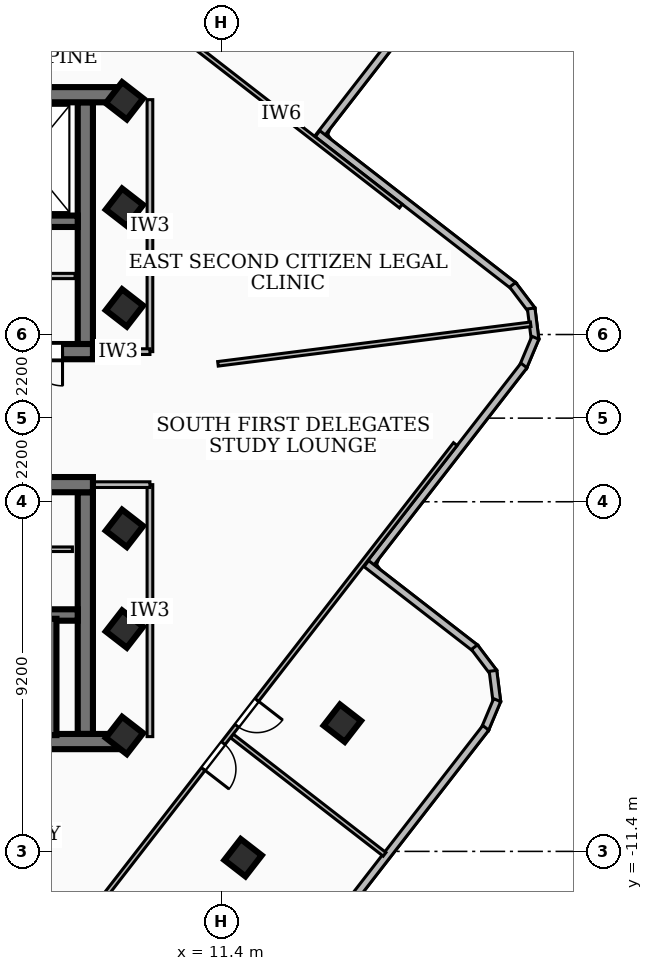
"""IFC4 building model, lengths in metres.
Left out: names, types, materials, properties, quantities, classifications, styles, units other than length and angle.
Written with IfcOpenShell. Run it as: python <this file> out.ifc"""

import sys

from ifc_helpers import new_model, si_unit, direction, frame, frame_2d, origin, origin_2d, place, context, subcontext, project, spatial, rectangle, extrude, element, fill, save


model = new_model("IFC4")
c1 = context("Model", 3, precision=1e-05, world=origin(), true_north=direction((0.0, 1.0)))
c2 = subcontext(c1, "Body", "Model", "MODEL_VIEW")
j1 = project(units=[si_unit("LENGTHUNIT", "METRE"), si_unit("PLANEANGLEUNIT", "RADIAN")], contexts=[c1])
p1 = place(None, origin())
s1 = spatial("IfcSite", under=j1, at=p1, CompositionType="ELEMENT")
p2 = place(p1, origin())
s2 = spatial("IfcBuilding", under=s1, at=p2, CompositionType="ELEMENT")
p3 = place(p2, frame((0.0, 0.0, 261.18)))
s3 = spatial("IfcBuildingStorey", under=s2, at=p3, CompositionType="ELEMENT", Elevation=261.18)
p4 = place(p3, frame((-8.78, 8.51, 0.0), z_axis=(0.0, 0.0, 1.0), x_axis=(1.0, 0.0, 0.0)))
e1 = element("IfcWall", 1, at=p4, inside=s3, PredefinedType="SHEAR", context=c2, shape_type="SweptSolid", body=[
    extrude(rectangle(XDim=17.56, YDim=0.4, at=frame_2d((8.78, 0.0))), origin(), (0.0, 0.0, 1.0), 3.16),
])
p5 = place(p3, frame((8.02, 1.75, 0.0), z_axis=(0.0, 0.0, 1.0), x_axis=(-1.0, 0.0, 0.0)))
e2 = element("IfcWall", 2, at=p5, inside=s3, PredefinedType="SHEAR", context=c2, shape_type="SweptSolid", body=[
    extrude(rectangle(XDim=16.04, YDim=0.4, at=frame_2d((8.02, 0.0))), origin(), (0.0, 0.0, 1.0), 3.16),
])
p6 = place(p5, frame((7.45, 0.0, 0.0)))
e3 = element("IfcOpeningElement", 3, at=p6, cuts=e2, PredefinedType="OPENING", context=c2, shape_type="SweptSolid", body=[
    extrude(rectangle(XDim=1.0, YDim=2.1, at=frame_2d((0.5, 1.05))), frame((0.0, 0.21, 0.0), z_axis=(0.0, -1.0, 0.0), x_axis=(1.0, 0.0, 0.0)), (0.0, 0.0, 1.0), 0.42),
])
p7 = place(p5, frame((14.285, 0.0, 0.0)))
e4 = element("IfcOpeningElement", 4, at=p7, cuts=e2, PredefinedType="OPENING", context=c2, shape_type="SweptSolid", body=[
    extrude(rectangle(XDim=1.05, YDim=2.15, at=frame_2d((0.525, 1.075))), frame((0.0, 0.21, 0.0), z_axis=(0.0, -1.0, 0.0), x_axis=(1.0, 0.0, 0.0)), (0.0, 0.0, 1.0), 0.42),
])
p8 = place(p5, frame((12.725, 0.0, 0.0)))
e5 = element("IfcOpeningElement", 5, at=p8, cuts=e2, PredefinedType="OPENING", context=c2, shape_type="SweptSolid", body=[
    extrude(rectangle(XDim=1.05, YDim=2.15, at=frame_2d((0.525, 1.075))), frame((0.0, 0.21, 0.0), z_axis=(0.0, -1.0, 0.0), x_axis=(1.0, 0.0, 0.0)), (0.0, 0.0, 1.0), 0.42),
])
p9 = place(p5, frame((11.165, 0.0, 0.0)))
e6 = element("IfcOpeningElement", 6, at=p9, cuts=e2, PredefinedType="OPENING", context=c2, shape_type="SweptSolid", body=[
    extrude(rectangle(XDim=1.05, YDim=2.15, at=frame_2d((0.525, 1.075))), frame((0.0, 0.21, 0.0), z_axis=(0.0, -1.0, 0.0), x_axis=(1.0, 0.0, 0.0)), (0.0, 0.0, 1.0), 0.42),
])
p10 = place(p5, frame((3.85, 0.0, 0.0)))
e7 = element("IfcOpeningElement", 7, at=p10, cuts=e2, PredefinedType="OPENING", context=c2, shape_type="SweptSolid", body=[
    extrude(rectangle(XDim=0.9, YDim=2.06, at=frame_2d((0.45, 1.03))), frame((0.0, 0.21, 0.0), z_axis=(0.0, -1.0, 0.0), x_axis=(1.0, 0.0, 0.0)), (0.0, 0.0, 1.0), 0.42),
])
p11 = place(p5, frame((2.35, 0.0, 0.0)))
e8 = element("IfcOpeningElement", 8, at=p11, cuts=e2, PredefinedType="OPENING", context=c2, shape_type="SweptSolid", body=[
    extrude(rectangle(XDim=0.9, YDim=2.06, at=frame_2d((0.45, 1.03))), frame((0.0, 0.21, 0.0), z_axis=(0.0, -1.0, 0.0), x_axis=(1.0, 0.0, 0.0)), (0.0, 0.0, 1.0), 0.42),
])
p12 = place(p5, frame((0.8, 0.0, 0.0)))
e9 = element("IfcOpeningElement", 9, at=p12, cuts=e2, PredefinedType="OPENING", context=c2, shape_type="SweptSolid", body=[
    extrude(rectangle(XDim=0.9, YDim=2.06, at=frame_2d((0.45, 1.03))), frame((0.0, 0.21, 0.0), z_axis=(0.0, -1.0, 0.0), x_axis=(1.0, 0.0, 0.0)), (0.0, 0.0, 1.0), 0.42),
])
p13 = place(p3, frame((7.82, 8.31, 0.0), z_axis=(0.0, 0.0, 1.0), x_axis=(0.0, -1.0, 0.0)))
e10 = element("IfcWall", 10, at=p13, inside=s3, PredefinedType="SHEAR", context=c2, shape_type="SweptSolid", body=[
    extrude(rectangle(XDim=6.36, YDim=0.4, at=frame_2d((3.18, 0.0))), origin(), (0.0, 0.0, 1.0), 3.16),
])
p14 = place(p3, frame((7.62, 5.18, 0.0), z_axis=(0.0, 0.0, 1.0), x_axis=(-1.0, 0.0, 0.0)))
e11 = element("IfcWall", 11, at=p14, inside=s3, PredefinedType="SOLIDWALL", context=c2, shape_type="SweptSolid", body=[
    extrude(rectangle(XDim=15.24, YDim=0.3, at=frame_2d((7.62, 0.0))), origin(), (0.0, 0.0, 1.0), 3.16),
])
p15 = place(p14, frame((5.77, 0.0, 0.0)))
e12 = element("IfcOpeningElement", 12, at=p15, cuts=e11, PredefinedType="OPENING", context=c2, shape_type="SweptSolid", body=[
    extrude(rectangle(XDim=1.1, YDim=2.15, at=frame_2d((0.55, 1.075))), frame((0.0, 0.16, 0.0), z_axis=(0.0, -1.0, 0.0), x_axis=(1.0, 0.0, 0.0)), (0.0, 0.0, 1.0), 0.32),
])
p16 = place(p14, frame((2.97, 0.0, 0.0)))
e13 = element("IfcOpeningElement", 13, at=p16, cuts=e11, PredefinedType="OPENING", context=c2, shape_type="SweptSolid", body=[
    extrude(rectangle(XDim=1.1, YDim=2.15, at=frame_2d((0.55, 1.075))), frame((0.0, 0.16, 0.0), z_axis=(0.0, -1.0, 0.0), x_axis=(1.0, 0.0, 0.0)), (0.0, 0.0, 1.0), 0.32),
])
p17 = place(p14, frame((7.97, 0.0, 0.0)))
e14 = element("IfcOpeningElement", 14, at=p17, cuts=e11, PredefinedType="OPENING", context=c2, shape_type="SweptSolid", body=[
    extrude(rectangle(XDim=1.0, YDim=2.1, at=frame_2d((0.5, 1.05))), frame((0.0, 0.16, 0.0), z_axis=(0.0, -1.0, 0.0), x_axis=(1.0, 0.0, 0.0)), (0.0, 0.0, 1.0), 0.32),
])
p18 = place(p3, frame((8.78, -8.51, 0.0), z_axis=(0.0, 0.0, 1.0), x_axis=(-1.0, 0.0, 0.0)))
e15 = element("IfcWall", 15, at=p18, inside=s3, PredefinedType="SHEAR", context=c2, shape_type="SweptSolid", body=[
    extrude(rectangle(XDim=17.56, YDim=0.4, at=frame_2d((8.78, 0.0))), origin(), (0.0, 0.0, 1.0), 3.16),
])
p19 = place(p3, frame((-8.02, -1.75, 0.0), z_axis=(0.0, 0.0, 1.0), x_axis=(1.0, 0.0, 0.0)))
e16 = element("IfcWall", 16, at=p19, inside=s3, PredefinedType="SHEAR", context=c2, shape_type="SweptSolid", body=[
    extrude(rectangle(XDim=16.04, YDim=0.4, at=frame_2d((8.02, 0.0))), origin(), (0.0, 0.0, 1.0), 3.16),
])
p20 = place(p19, frame((7.45, 0.0, 0.0)))
e17 = element("IfcOpeningElement", 17, at=p20, cuts=e16, PredefinedType="OPENING", context=c2, shape_type="SweptSolid", body=[
    extrude(rectangle(XDim=1.0, YDim=2.1, at=frame_2d((0.5, 1.05))), frame((0.0, 0.21, 0.0), z_axis=(0.0, -1.0, 0.0), x_axis=(1.0, 0.0, 0.0)), (0.0, 0.0, 1.0), 0.42),
])
p21 = place(p19, frame((12.65, 0.0, 0.0)))
e18 = element("IfcOpeningElement", 18, at=p21, cuts=e16, PredefinedType="OPENING", context=c2, shape_type="SweptSolid", body=[
    extrude(rectangle(XDim=0.9, YDim=2.06, at=frame_2d((0.45, 1.03))), frame((0.0, 0.21, 0.0), z_axis=(0.0, -1.0, 0.0), x_axis=(1.0, 0.0, 0.0)), (0.0, 0.0, 1.0), 0.42),
])
p22 = place(p19, frame((2.25, 0.0, 0.0)))
e19 = element("IfcOpeningElement", 19, at=p22, cuts=e16, PredefinedType="OPENING", context=c2, shape_type="SweptSolid", body=[
    extrude(rectangle(XDim=0.9, YDim=2.06, at=frame_2d((0.45, 1.03))), frame((0.0, 0.21, 0.0), z_axis=(0.0, -1.0, 0.0), x_axis=(1.0, 0.0, 0.0)), (0.0, 0.0, 1.0), 0.42),
])
p23 = place(p3, frame((7.82, -1.95, 0.0), z_axis=(0.0, 0.0, 1.0), x_axis=(0.0, -1.0, 0.0)))
e20 = element("IfcWall", 20, at=p23, inside=s3, PredefinedType="SHEAR", context=c2, shape_type="SweptSolid", body=[
    extrude(rectangle(XDim=6.36, YDim=0.4, at=frame_2d((3.18, 0.0))), origin(), (0.0, 0.0, 1.0), 3.16),
])
p24 = place(p3, frame((-7.62, -5.18, 0.0), z_axis=(0.0, 0.0, 1.0), x_axis=(1.0, 0.0, 0.0)))
e21 = element("IfcWall", 21, at=p24, inside=s3, PredefinedType="SOLIDWALL", context=c2, shape_type="SweptSolid", body=[
    extrude(rectangle(XDim=15.24, YDim=0.3, at=frame_2d((7.62, 0.0))), origin(), (0.0, 0.0, 1.0), 3.16),
])
p25 = place(p24, frame((5.77, 0.0, 0.0)))
e22 = element("IfcOpeningElement", 22, at=p25, cuts=e21, PredefinedType="OPENING", context=c2, shape_type="SweptSolid", body=[
    extrude(rectangle(XDim=1.1, YDim=2.15, at=frame_2d((0.55, 1.075))), frame((0.0, 0.16, 0.0), z_axis=(0.0, -1.0, 0.0), x_axis=(1.0, 0.0, 0.0)), (0.0, 0.0, 1.0), 0.32),
])
p26 = place(p24, frame((7.97, 0.0, 0.0)))
e23 = element("IfcOpeningElement", 23, at=p26, cuts=e21, PredefinedType="OPENING", context=c2, shape_type="SweptSolid", body=[
    extrude(rectangle(XDim=1.0, YDim=2.1, at=frame_2d((0.5, 1.05))), frame((0.0, 0.16, 0.0), z_axis=(0.0, -1.0, 0.0), x_axis=(1.0, 0.0, 0.0)), (0.0, 0.0, 1.0), 0.32),
])
p27 = place(p3, frame((6.95, -8.34, 0.0), z_axis=(0.0, 0.0, 1.0), x_axis=(0.0, 1.0, 0.0)))
e24 = element("IfcWall", 24, at=p27, inside=s3, PredefinedType="SOLIDWALL", context=c2, shape_type="SweptSolid", body=[
    extrude(rectangle(XDim=3.06, YDim=0.22, at=frame_2d((1.53, 0.0))), origin(), (0.0, 0.0, 1.0), 3.16),
])
for number, where, z_axis, x_axis in (
    (25, (8.85, -5.55, 0.0), (0.0, 0.0, 1.0), (0.613, 0.79, 0.0)),
    (26, (8.85, -2.9, 0.0), (0.0, 0.0, 1.0), (0.613, 0.79, 0.0)),
    (27, (8.85, 2.9, 0.0), (0.0, 0.0, 1.0), (0.613, 0.79, 0.0)),
    (28, (8.85, 5.55, 0.0), (0.0, 0.0, 1.0), (0.613, 0.79, 0.0)),
    (29, (8.85, -8.35, 0.0), (0.0, 0.0, 1.0), (0.613, 0.79, 0.0)),
    (30, (8.85, 8.35, 0.0), (0.0, 0.0, 1.0), (0.613, 0.79, 0.0)),
    (31, (11.971, -11.566, 0.0), (0.0, 0.0, 1.0), (0.613, 0.79, 0.0)),
    (32, (14.583, -8.026, 0.0), (0.0, 0.0, 1.0), (0.613, 0.79, 0.0)),
):
    element("IfcColumn", number, at=place(p3, frame(where, z_axis=z_axis, x_axis=x_axis)), inside=s3, PredefinedType="COLUMN", context=c2, shape_type="SweptSolid", body=[
        extrude(rectangle(XDim=0.7, YDim=0.7, at=origin_2d()), origin(), (0.0, 0.0, 1.0), 3.42),
    ])
p28 = place(p3, frame((18.995, 13.883, 0.0), z_axis=(0.0, 0.0, 1.0), x_axis=(-0.612894114019, -0.790165049215, 0.0)))
e33 = element("IfcWall", 33, at=p28, inside=s3, PredefinedType="SOLIDWALL", context=c2, shape_type="SweptSolid", body=[
    extrude(rectangle(XDim=8.241, YDim=0.2, at=frame_2d((4.121, 0.0))), origin(), (0.0, 0.0, 1.0), 3.16),
])
p29 = place(p28, frame((0.85, 0.0, 0.85)))
e34 = element("IfcOpeningElement", 34, at=p29, cuts=e33, PredefinedType="OPENING", context=c2, shape_type="SweptSolid", body=[
    extrude(rectangle(XDim=2.1, YDim=1.6, at=frame_2d((1.05, 0.8))), frame((0.0, 0.11, 0.0), z_axis=(0.0, -1.0, 0.0), x_axis=(1.0, 0.0, 0.0)), (0.0, 0.0, 1.0), 0.22),
])
p30 = place(p3, frame((13.93, 7.483, 0.0), z_axis=(0.0, 0.0, 1.0), x_axis=(0.790217588081, -0.612826373036, 0.0)))
e35 = element("IfcWall", 35, at=p30, inside=s3, PredefinedType="SOLIDWALL", context=c2, shape_type="SweptSolid", body=[
    extrude(rectangle(XDim=6.542, YDim=0.2, at=frame_2d((3.271, 0.0))), origin(), (0.0, 0.0, 1.0), 3.16),
])
p31 = place(p3, frame((19.064, 3.509, 0.0), z_axis=(0.0, 0.0, 1.0), x_axis=(0.603908166539, -0.797053904317, 0.0)))
e36 = element("IfcWall", 36, at=p31, inside=s3, PredefinedType="SOLIDWALL", context=c2, shape_type="SweptSolid", body=[
    extrude(rectangle(XDim=0.838, YDim=0.2, at=frame_2d((0.419, 0.0))), origin(), (0.0, 0.0, 1.0), 3.16),
])
p32 = place(p3, frame((19.552, 2.886, 0.0), z_axis=(0.0, 0.0, 1.0), x_axis=(0.124799052175, -0.992182038023, 0.0)))
e37 = element("IfcWall", 37, at=p32, inside=s3, PredefinedType="SOLIDWALL", context=c2, shape_type="SweptSolid", body=[
    extrude(rectangle(XDim=0.825, YDim=0.2, at=frame_2d((0.413, 0.0))), origin(), (0.0, 0.0, 1.0), 3.16),
])
p33 = place(p3, frame((19.662, 2.115, 0.0), z_axis=(0.0, 0.0, 1.0), x_axis=(-0.388213349612, -0.921569528133, 0.0)))
e38 = element("IfcWall", 38, at=p33, inside=s3, PredefinedType="SOLIDWALL", context=c2, shape_type="SweptSolid", body=[
    extrude(rectangle(XDim=0.838, YDim=0.2, at=frame_2d((0.419, 0.0))), origin(), (0.0, 0.0, 1.0), 3.16),
])
p34 = place(p3, frame((19.362, 1.386, 0.0), z_axis=(0.0, 0.0, 1.0), x_axis=(-0.613007625303, -0.790076990755, 0.0)))
e39 = element("IfcWall", 39, at=p34, inside=s3, PredefinedType="SOLIDWALL", context=c2, shape_type="SweptSolid", body=[
    extrude(rectangle(XDim=6.742, YDim=0.2, at=frame_2d((3.371, 0.0))), origin(), (0.0, 0.0, 1.0), 3.16),
])
p35 = place(p3, frame((15.215, -3.829, 0.0), z_axis=(0.0, 0.0, 1.0), x_axis=(0.790311198889, -0.612705646221, 0.0)))
e40 = element("IfcWall", 40, at=p35, inside=s3, PredefinedType="SOLIDWALL", context=c2, shape_type="SweptSolid", body=[
    extrude(rectangle(XDim=3.643, YDim=0.2, at=frame_2d((1.821, 0.0))), origin(), (0.0, 0.0, 1.0), 3.16),
])
p36 = place(p3, frame((18.059, -6.026, 0.0), z_axis=(0.0, 0.0, 1.0), x_axis=(0.603582833373, -0.797300296787, 0.0)))
e41 = element("IfcWall", 41, at=p36, inside=s3, PredefinedType="SOLIDWALL", context=c2, shape_type="SweptSolid", body=[
    extrude(rectangle(XDim=0.838, YDim=0.2, at=frame_2d((0.419, 0.0))), origin(), (0.0, 0.0, 1.0), 3.16),
])
p37 = place(p3, frame((18.547, -6.649, 0.0), z_axis=(0.0, 0.0, 1.0), x_axis=(0.124507909692, -0.992218615238, 0.0)))
e42 = element("IfcWall", 42, at=p37, inside=s3, PredefinedType="SOLIDWALL", context=c2, shape_type="SweptSolid", body=[
    extrude(rectangle(XDim=0.825, YDim=0.2, at=frame_2d((0.413, 0.0))), origin(), (0.0, 0.0, 1.0), 3.16),
])
p38 = place(p3, frame((18.657, -7.42, 0.0), z_axis=(0.0, 0.0, 1.0), x_axis=(-0.387965780676, -0.921673777985, 0.0)))
e43 = element("IfcWall", 43, at=p38, inside=s3, PredefinedType="SOLIDWALL", context=c2, shape_type="SweptSolid", body=[
    extrude(rectangle(XDim=0.838, YDim=0.2, at=frame_2d((0.419, 0.0))), origin(), (0.0, 0.0, 1.0), 3.16),
])
p39 = place(p3, frame((18.357, -8.149, 0.0), z_axis=(0.0, 0.0, 1.0), x_axis=(-0.612797548915, -0.790239940806, 0.0)))
e44 = element("IfcWall", 44, at=p39, inside=s3, PredefinedType="SOLIDWALL", context=c2, shape_type="SweptSolid", body=[
    extrude(rectangle(XDim=9.824, YDim=0.2, at=frame_2d((4.912, 0.0))), origin(), (0.0, 0.0, 1.0), 3.16),
])
p40 = place(p39, frame((6.612, 0.0, 0.85)))
e45 = element("IfcOpeningElement", 45, at=p40, cuts=e44, PredefinedType="OPENING", context=c2, shape_type="SweptSolid", body=[
    extrude(rectangle(XDim=2.1, YDim=1.6, at=frame_2d((1.05, 0.8))), frame((0.0, 0.11, 0.0), z_axis=(0.0, -1.0, 0.0), x_axis=(1.0, 0.0, 0.0)), (0.0, 0.0, 1.0), 0.22),
])
p41 = place(p3, frame((2.9, 3.74, 0.0), z_axis=(0.0, 0.0, 1.0), x_axis=(1.0, 0.0, 0.0)))
e46 = element("IfcWall", 46, at=p41, inside=s3, PredefinedType="PARTITIONING", context=c2, shape_type="SweptSolid", body=[
    extrude(rectangle(XDim=4.65, YDim=0.138, at=frame_2d((2.325, 0.0))), origin(), (0.0, 0.0, 1.0), 3.16),
])
p42 = place(p3, frame((2.8, -3.45, 0.0), z_axis=(0.0, 0.0, 1.0), x_axis=(1.0, 0.0, 0.0)))
e47 = element("IfcWall", 47, at=p42, inside=s3, PredefinedType="PARTITIONING", context=c2, shape_type="SweptSolid", body=[
    extrude(rectangle(XDim=4.68, YDim=0.12, at=frame_2d((2.34, 0.0))), origin(), (0.0, 0.0, 1.0), 3.16),
])
p43 = place(p42, frame((1.9, 0.0, 0.0)))
e48 = element("IfcOpeningElement", 48, at=p43, cuts=e47, PredefinedType="OPENING", context=c2, shape_type="SweptSolid", body=[
    extrude(rectangle(XDim=0.86, YDim=2.04, at=frame_2d((0.43, 1.02))), frame((0.0, 0.07, 0.0), z_axis=(0.0, -1.0, 0.0), x_axis=(1.0, 0.0, 0.0)), (0.0, 0.0, 1.0), 0.14),
])
p44 = place(p3, frame((9.52, 1.75, 0.0), z_axis=(0.0, 0.0, 1.0), x_axis=(0.0, 1.0, 0.0)))
e49 = element("IfcWall", 49, at=p44, inside=s3, PredefinedType="PARTITIONING", context=c2, shape_type="SweptSolid", body=[
    extrude(rectangle(XDim=6.63, YDim=0.15, at=frame_2d((3.315, 0.0))), origin(), (0.0, 0.0, 1.0), 3.16),
])
p45 = place(p3, frame((7.85, 1.75, 0.0), z_axis=(0.0, 0.0, 1.0), x_axis=(1.0, 0.0, 0.0)))
e50 = element("IfcWall", 50, at=p45, inside=s3, PredefinedType="PARTITIONING", context=c2, shape_type="SweptSolid", body=[
    extrude(rectangle(XDim=1.67, YDim=0.15, at=frame_2d((0.835, 0.0))), origin(), (0.0, 0.0, 1.0), 2.39),
])
p46 = place(p3, frame((9.52, -8.38, 0.0), z_axis=(0.0, 0.0, 1.0), x_axis=(0.0, 1.0, 0.0)))
e51 = element("IfcWall", 51, at=p46, inside=s3, PredefinedType="PARTITIONING", context=c2, shape_type="SweptSolid", body=[
    extrude(rectangle(XDim=6.63, YDim=0.15, at=frame_2d((3.315, 0.0))), origin(), (0.0, 0.0, 1.0), 2.53),
])
p47 = place(p3, frame((7.85, -1.75, 0.0), z_axis=(0.0, 0.0, 1.0), x_axis=(1.0, 0.0, 0.0)))
e52 = element("IfcWall", 52, at=p47, inside=s3, PredefinedType="PARTITIONING", context=c2, shape_type="SweptSolid", body=[
    extrude(rectangle(XDim=1.67, YDim=0.15, at=frame_2d((0.835, 0.0))), origin(), (0.0, 0.0, 1.0), 2.39),
])
p48 = place(p3, frame((11.31, 1.429, 0.0), z_axis=(0.0, 0.0, 1.0), x_axis=(0.992107592132, 0.125389495712, 0.0)))
e53 = element("IfcWall", 53, at=p48, inside=s3, PredefinedType="PARTITIONING", context=c2, shape_type="SweptSolid", body=[
    extrude(rectangle(XDim=8.294, YDim=0.12, at=frame_2d((4.147, 0.0))), origin(), (0.0, 0.0, 1.0), 3.16),
])
p49 = place(p3, frame((16.122, 5.578, 0.0), z_axis=(0.0, 0.0, 1.0), x_axis=(-0.7900346363, 0.613062210094, 0.0)))
e54 = element("IfcWall", 54, at=p49, inside=s3, PredefinedType="PARTITIONING", context=c2, shape_type="SweptSolid", body=[
    extrude(rectangle(XDim=7.95, YDim=0.12, at=frame_2d((3.975, 0.0))), origin(), (0.0, 0.0, 1.0), 2.53),
])
p50 = place(p3, frame((11.676, -8.361, 0.0), z_axis=(0.0, 0.0, 1.0), x_axis=(0.790227868115, -0.612813117071, 0.0)))
e55 = element("IfcWall", 55, at=p50, inside=s3, PredefinedType="PARTITIONING", context=c2, shape_type="SweptSolid", body=[
    extrude(rectangle(XDim=5.085, YDim=0.12, at=frame_2d((2.542, 0.0))), origin(), (0.0, 0.0, 1.0), 3.16),
])
p51 = place(p3, frame((17.555, -0.683, 0.0), z_axis=(0.0, 0.0, 1.0), x_axis=(-0.61291959311, -0.790145285617, 0.0)))
e56 = element("IfcWall", 56, at=p51, inside=s3, PredefinedType="PARTITIONING", context=c2, shape_type="SweptSolid", body=[
    extrude(rectangle(XDim=20.239, YDim=0.12, at=frame_2d((10.12, 0.0))), origin(), (0.0, 0.0, 1.0), 2.53),
])
p52 = place(p51, frame((9.96, 0.0, 0.0)))
e57 = element("IfcOpeningElement", 57, at=p52, cuts=e56, PredefinedType="OPENING", context=c2, shape_type="SweptSolid", body=[
    extrude(rectangle(XDim=0.86, YDim=2.04, at=frame_2d((0.43, 1.02))), frame((0.0, 0.07, 0.0), z_axis=(0.0, -1.0, 0.0), x_axis=(1.0, 0.0, 0.0)), (0.0, 0.0, 1.0), 0.14),
])
p53 = place(p51, frame((8.52, 0.0, 0.0)))
e58 = element("IfcOpeningElement", 58, at=p53, cuts=e56, PredefinedType="OPENING", context=c2, shape_type="SweptSolid", body=[
    extrude(rectangle(XDim=0.86, YDim=2.04, at=frame_2d((0.43, 1.02))), frame((0.0, 0.07, 0.0), z_axis=(0.0, -1.0, 0.0), x_axis=(1.0, 0.0, 0.0)), (0.0, 0.0, 1.0), 0.14),
])
p54 = place(p12, origin())
e59 = element("IfcDoor", 59, at=p54, inside=s3, OperationType="SINGLE_SWING_LEFT", PredefinedType="DOOR", context=c2, shape_type="SweptSolid", body=[
    extrude(rectangle(XDim=0.9, YDim=2.06, at=frame_2d((0.45, 1.03))), frame((0.0, 0.025, 0.0), z_axis=(0.0, -1.0, 0.0), x_axis=(1.0, 0.0, 0.0)), (0.0, 0.0, 1.0), 0.05),
])
fill(e9, e59)
p55 = place(p52, origin())
e60 = element("IfcDoor", 60, at=p55, inside=s3, OperationType="SINGLE_SWING_RIGHT", PredefinedType="DOOR", context=c2, shape_type="SweptSolid", body=[
    extrude(rectangle(XDim=0.86, YDim=2.04, at=frame_2d((0.43, 1.02))), frame((0.0, 0.025, 0.0), z_axis=(0.0, -1.0, 0.0), x_axis=(1.0, 0.0, 0.0)), (0.0, 0.0, 1.0), 0.05),
])
fill(e57, e60)
p56 = place(p53, origin())
e61 = element("IfcDoor", 61, at=p56, inside=s3, OperationType="SINGLE_SWING_LEFT", PredefinedType="DOOR", context=c2, shape_type="SweptSolid", body=[
    extrude(rectangle(XDim=0.86, YDim=2.04, at=frame_2d((0.43, 1.02))), frame((0.0, 0.025, 0.0), z_axis=(0.0, -1.0, 0.0), x_axis=(1.0, 0.0, 0.0)), (0.0, 0.0, 1.0), 0.05),
])
fill(e58, e61)
save(model, sys.argv[1])
